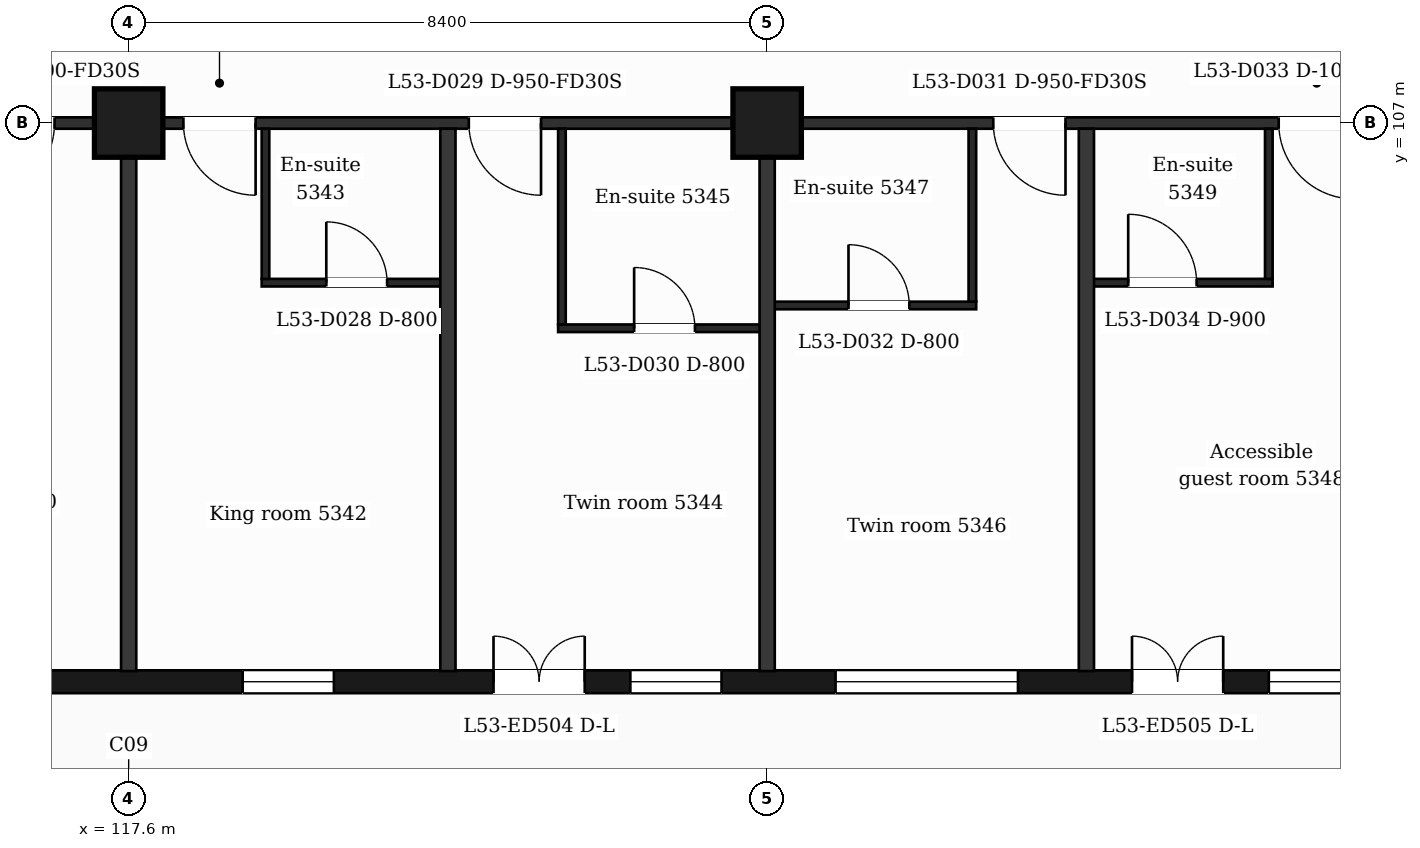
"""IFC4 building model, lengths in metres.
Left out: names, types, materials, properties, quantities, classifications, styles, units other than length and angle.
Written with IfcOpenShell. Run it as: python <this file> out.ifc"""

import sys

from ifc_helpers import new_model, si_unit, direction, frame, frame_2d, origin, origin_2d, place, context, subcontext, project, spatial, rectangle, extrude, element, fill, save


model = new_model("IFC4")
c1 = context("Model", 3, precision=1e-05, world=origin(), true_north=direction((0.0, 1.0)))
c2 = subcontext(c1, "Body", "Model", "MODEL_VIEW")
j1 = project(units=[si_unit("LENGTHUNIT", "METRE"), si_unit("PLANEANGLEUNIT", "RADIAN")], contexts=[c1])
p1 = place(None, origin())
s1 = spatial("IfcSite", under=j1, at=p1, CompositionType="ELEMENT")
p2 = place(p1, origin())
s2 = spatial("IfcBuilding", under=s1, at=p2, CompositionType="ELEMENT")
p3 = place(p2, frame((0.0, 0.0, 220.7)))
s3 = spatial("IfcBuildingStorey", under=s2, at=p3, CompositionType="ELEMENT", Elevation=220.7)
for number, where, z_axis, x_axis in (
    (1, (117.6, 107.0, 0.0), (0.0, 0.0, 1.0), (1.0, 0.0, 0.0)),
    (2, (126.0, 107.0, 0.0), (0.0, 0.0, 1.0), (1.0, 0.0, 0.0)),
):
    element("IfcColumn", number, at=place(p3, frame(where, z_axis=z_axis, x_axis=x_axis)), inside=s3, PredefinedType="COLUMN", context=c2, shape_type="SweptSolid", body=[
        extrude(rectangle(XDim=0.9, YDim=0.9, at=origin_2d()), origin(), (0.0, 0.0, 1.0), 3.7),
    ])
p4 = place(p3, frame((89.85, 99.65, 0.0), z_axis=(0.0, 0.0, 1.0), x_axis=(1.0, 0.0, 0.0)))
e3 = element("IfcWall", 3, at=p4, inside=s3, PredefinedType="SOLIDWALL", context=c2, shape_type="SweptSolid", body=[
    extrude(rectangle(XDim=47.25, YDim=0.3, at=frame_2d((23.625, 0.0))), origin(), (0.0, 0.0, 1.0), 3.38),
])
p5 = place(p4, frame((0.725, 0.0, 0.9)))
e4 = element("IfcOpeningElement", 4, at=p5, cuts=e3, PredefinedType="OPENING", context=c2, shape_type="SweptSolid", body=[
    extrude(rectangle(XDim=1.2, YDim=2.1, at=frame_2d((0.6, 1.05))), frame((0.0, 0.16, 0.0), z_axis=(0.0, -1.0, 0.0), x_axis=(1.0, 0.0, 0.0)), (0.0, 0.0, 1.0), 0.32),
])
p6 = place(p4, frame((3.45, 0.0, 0.9)))
e5 = element("IfcOpeningElement", 5, at=p6, cuts=e3, PredefinedType="OPENING", context=c2, shape_type="SweptSolid", body=[
    extrude(rectangle(XDim=2.4, YDim=2.1, at=frame_2d((1.2, 1.05))), frame((0.0, 0.16, 0.0), z_axis=(0.0, -1.0, 0.0), x_axis=(1.0, 0.0, 0.0)), (0.0, 0.0, 1.0), 0.32),
])
p7 = place(p4, frame((7.65, 0.0, 0.9)))
e6 = element("IfcOpeningElement", 6, at=p7, cuts=e3, PredefinedType="OPENING", context=c2, shape_type="SweptSolid", body=[
    extrude(rectangle(XDim=2.4, YDim=2.1, at=frame_2d((1.2, 1.05))), frame((0.0, 0.16, 0.0), z_axis=(0.0, -1.0, 0.0), x_axis=(1.0, 0.0, 0.0)), (0.0, 0.0, 1.0), 0.32),
])
p8 = place(p4, frame((11.85, 0.0, 0.9)))
e7 = element("IfcOpeningElement", 7, at=p8, cuts=e3, PredefinedType="OPENING", context=c2, shape_type="SweptSolid", body=[
    extrude(rectangle(XDim=2.4, YDim=2.1, at=frame_2d((1.2, 1.05))), frame((0.0, 0.16, 0.0), z_axis=(0.0, -1.0, 0.0), x_axis=(1.0, 0.0, 0.0)), (0.0, 0.0, 1.0), 0.32),
])
p9 = place(p4, frame((16.05, 0.0, 0.9)))
e8 = element("IfcOpeningElement", 8, at=p9, cuts=e3, PredefinedType="OPENING", context=c2, shape_type="SweptSolid", body=[
    extrude(rectangle(XDim=2.4, YDim=2.1, at=frame_2d((1.2, 1.05))), frame((0.0, 0.16, 0.0), z_axis=(0.0, -1.0, 0.0), x_axis=(1.0, 0.0, 0.0)), (0.0, 0.0, 1.0), 0.32),
])
p10 = place(p4, frame((20.25, 0.0, 0.9)))
e9 = element("IfcOpeningElement", 9, at=p10, cuts=e3, PredefinedType="OPENING", context=c2, shape_type="SweptSolid", body=[
    extrude(rectangle(XDim=2.4, YDim=2.1, at=frame_2d((1.2, 1.05))), frame((0.0, 0.16, 0.0), z_axis=(0.0, -1.0, 0.0), x_axis=(1.0, 0.0, 0.0)), (0.0, 0.0, 1.0), 0.32),
])
p11 = place(p4, frame((25.05, 0.0, 0.9)))
e10 = element("IfcOpeningElement", 10, at=p11, cuts=e3, PredefinedType="OPENING", context=c2, shape_type="SweptSolid", body=[
    extrude(rectangle(XDim=1.2, YDim=2.1, at=frame_2d((0.6, 1.05))), frame((0.0, 0.16, 0.0), z_axis=(0.0, -1.0, 0.0), x_axis=(1.0, 0.0, 0.0)), (0.0, 0.0, 1.0), 0.32),
])
p12 = place(p4, frame((29.25, 0.0, 0.9)))
e11 = element("IfcOpeningElement", 11, at=p12, cuts=e3, PredefinedType="OPENING", context=c2, shape_type="SweptSolid", body=[
    extrude(rectangle(XDim=1.2, YDim=2.1, at=frame_2d((0.6, 1.05))), frame((0.0, 0.16, 0.0), z_axis=(0.0, -1.0, 0.0), x_axis=(1.0, 0.0, 0.0)), (0.0, 0.0, 1.0), 0.32),
])
p13 = place(p4, frame((32.55, 0.0, 0.0)))
e12 = element("IfcOpeningElement", 12, at=p13, cuts=e3, PredefinedType="OPENING", context=c2, shape_type="SweptSolid", body=[
    extrude(rectangle(XDim=1.2, YDim=2.4, at=frame_2d((0.6, 1.2))), frame((0.0, 0.16, 0.0), z_axis=(0.0, -1.0, 0.0), x_axis=(1.0, 0.0, 0.0)), (0.0, 0.0, 1.0), 0.32),
])
p14 = place(p4, frame((34.35, 0.0, 0.9)))
e13 = element("IfcOpeningElement", 13, at=p14, cuts=e3, PredefinedType="OPENING", context=c2, shape_type="SweptSolid", body=[
    extrude(rectangle(XDim=1.2, YDim=2.1, at=frame_2d((0.6, 1.05))), frame((0.0, 0.16, 0.0), z_axis=(0.0, -1.0, 0.0), x_axis=(1.0, 0.0, 0.0)), (0.0, 0.0, 1.0), 0.32),
])
p15 = place(p4, frame((37.05, 0.0, 0.9)))
e14 = element("IfcOpeningElement", 14, at=p15, cuts=e3, PredefinedType="OPENING", context=c2, shape_type="SweptSolid", body=[
    extrude(rectangle(XDim=2.4, YDim=2.1, at=frame_2d((1.2, 1.05))), frame((0.0, 0.16, 0.0), z_axis=(0.0, -1.0, 0.0), x_axis=(1.0, 0.0, 0.0)), (0.0, 0.0, 1.0), 0.32),
])
p16 = place(p4, frame((40.95, 0.0, 0.0)))
e15 = element("IfcOpeningElement", 15, at=p16, cuts=e3, PredefinedType="OPENING", context=c2, shape_type="SweptSolid", body=[
    extrude(rectangle(XDim=1.2, YDim=2.4, at=frame_2d((0.6, 1.2))), frame((0.0, 0.16, 0.0), z_axis=(0.0, -1.0, 0.0), x_axis=(1.0, 0.0, 0.0)), (0.0, 0.0, 1.0), 0.32),
])
p17 = place(p4, frame((42.75, 0.0, 0.9)))
e16 = element("IfcOpeningElement", 16, at=p17, cuts=e3, PredefinedType="OPENING", context=c2, shape_type="SweptSolid", body=[
    extrude(rectangle(XDim=1.2, YDim=2.1, at=frame_2d((0.6, 1.05))), frame((0.0, 0.16, 0.0), z_axis=(0.0, -1.0, 0.0), x_axis=(1.0, 0.0, 0.0)), (0.0, 0.0, 1.0), 0.32),
])
p18 = place(p4, frame((45.25, 0.0, 0.9)))
e17 = element("IfcOpeningElement", 17, at=p18, cuts=e3, PredefinedType="OPENING", context=c2, shape_type="SweptSolid", body=[
    extrude(rectangle(XDim=1.2, YDim=2.1, at=frame_2d((0.6, 1.05))), frame((0.0, 0.16, 0.0), z_axis=(0.0, -1.0, 0.0), x_axis=(1.0, 0.0, 0.0)), (0.0, 0.0, 1.0), 0.32),
])
p19 = place(p3, frame((123.25, 104.3, 0.0), z_axis=(0.0, 0.0, 1.0), x_axis=(1.0, 0.0, 0.0)))
e18 = element("IfcWall", 18, at=p19, inside=s3, PredefinedType="PARTITIONING", context=c2, shape_type="SweptSolid", body=[
    extrude(rectangle(XDim=2.75, YDim=0.1, at=frame_2d((1.375, 0.0))), origin(), (0.0, 0.0, 1.0), 3.38),
])
p20 = place(p19, frame((1.0, 0.0, 0.0)))
e19 = element("IfcOpeningElement", 19, at=p20, cuts=e18, PredefinedType="OPENING", context=c2, shape_type="SweptSolid", body=[
    extrude(rectangle(XDim=0.8, YDim=2.1, at=frame_2d((0.4, 1.05))), frame((0.0, 0.06, 0.0), z_axis=(0.0, -1.0, 0.0), x_axis=(1.0, 0.0, 0.0)), (0.0, 0.0, 1.0), 0.12),
])
p21 = place(p3, frame((126.0, 104.6, 0.0), z_axis=(0.0, 0.0, 1.0), x_axis=(1.0, 0.0, 0.0)))
e20 = element("IfcWall", 20, at=p21, inside=s3, PredefinedType="PARTITIONING", context=c2, shape_type="SweptSolid", body=[
    extrude(rectangle(XDim=2.75, YDim=0.1, at=frame_2d((1.375, 0.0))), origin(), (0.0, 0.0, 1.0), 3.38),
])
p22 = place(p21, frame((1.07, 0.0, 0.0)))
e21 = element("IfcOpeningElement", 21, at=p22, cuts=e20, PredefinedType="OPENING", context=c2, shape_type="SweptSolid", body=[
    extrude(rectangle(XDim=0.8, YDim=2.1, at=frame_2d((0.4, 1.05))), frame((0.0, 0.06, 0.0), z_axis=(0.0, -1.0, 0.0), x_axis=(1.0, 0.0, 0.0)), (0.0, 0.0, 1.0), 0.12),
])
p23 = place(p3, frame((119.35, 104.9, 0.0), z_axis=(0.0, 0.0, 1.0), x_axis=(1.0, 0.0, 0.0)))
e22 = element("IfcWall", 22, at=p23, inside=s3, PredefinedType="PARTITIONING", context=c2, shape_type="SweptSolid", body=[
    extrude(rectangle(XDim=2.45, YDim=0.1, at=frame_2d((1.225, 0.0))), origin(), (0.0, 0.0, 1.0), 3.38),
])
p24 = place(p23, frame((0.85, 0.0, 0.0)))
e23 = element("IfcOpeningElement", 23, at=p24, cuts=e22, PredefinedType="OPENING", context=c2, shape_type="SweptSolid", body=[
    extrude(rectangle(XDim=0.8, YDim=2.1, at=frame_2d((0.4, 1.05))), frame((0.0, 0.06, 0.0), z_axis=(0.0, -1.0, 0.0), x_axis=(1.0, 0.0, 0.0)), (0.0, 0.0, 1.0), 0.12),
])
p25 = place(p3, frame((130.2, 104.9, 0.0), z_axis=(0.0, 0.0, 1.0), x_axis=(1.0, 0.0, 0.0)))
e24 = element("IfcWall", 24, at=p25, inside=s3, PredefinedType="PARTITIONING", context=c2, shape_type="SweptSolid", body=[
    extrude(rectangle(XDim=2.45, YDim=0.1, at=frame_2d((1.225, 0.0))), origin(), (0.0, 0.0, 1.0), 3.38),
])
p26 = place(p25, frame((0.55, 0.0, 0.0)))
e25 = element("IfcOpeningElement", 25, at=p26, cuts=e24, PredefinedType="OPENING", context=c2, shape_type="SweptSolid", body=[
    extrude(rectangle(XDim=0.9, YDim=2.1, at=frame_2d((0.45, 1.05))), frame((0.0, 0.06, 0.0), z_axis=(0.0, -1.0, 0.0), x_axis=(1.0, 0.0, 0.0)), (0.0, 0.0, 1.0), 0.12),
])
p27 = place(p3, frame((87.018, 107.0, 0.0), z_axis=(0.0, 0.0, 1.0), x_axis=(1.0, 0.0, 0.0)))
e26 = element("IfcWall", 26, at=p27, inside=s3, PredefinedType="PARTITIONING", context=c2, shape_type="SweptSolid", body=[
    extrude(rectangle(XDim=52.765, YDim=0.15, at=frame_2d((26.382, 0.0))), origin(), (0.0, 0.0, 1.0), 3.38),
])
p28 = place(p27, frame((0.707, 0.0, 0.0)))
e27 = element("IfcOpeningElement", 27, at=p28, cuts=e26, PredefinedType="OPENING", context=c2, shape_type="SweptSolid", body=[
    extrude(rectangle(XDim=0.95, YDim=2.1, at=frame_2d((0.475, 1.05))), frame((0.0, 0.085, 0.0), z_axis=(0.0, -1.0, 0.0), x_axis=(1.0, 0.0, 0.0)), (0.0, 0.0, 1.0), 0.17),
])
p29 = place(p27, frame((6.894, 0.0, 0.0)))
e28 = element("IfcOpeningElement", 28, at=p29, cuts=e26, PredefinedType="OPENING", context=c2, shape_type="SweptSolid", body=[
    extrude(rectangle(XDim=0.95, YDim=2.1, at=frame_2d((0.475, 1.05))), frame((0.0, 0.085, 0.0), z_axis=(0.0, -1.0, 0.0), x_axis=(1.0, 0.0, 0.0)), (0.0, 0.0, 1.0), 0.17),
])
p30 = place(p27, frame((15.662, 0.0, 0.0)))
e29 = element("IfcOpeningElement", 29, at=p30, cuts=e26, PredefinedType="OPENING", context=c2, shape_type="SweptSolid", body=[
    extrude(rectangle(XDim=0.95, YDim=2.1, at=frame_2d((0.475, 1.05))), frame((0.0, 0.085, 0.0), z_axis=(0.0, -1.0, 0.0), x_axis=(1.0, 0.0, 0.0)), (0.0, 0.0, 1.0), 0.17),
])
p31 = place(p27, frame((18.257, 0.0, 0.0)))
e30 = element("IfcOpeningElement", 30, at=p31, cuts=e26, PredefinedType="OPENING", context=c2, shape_type="SweptSolid", body=[
    extrude(rectangle(XDim=0.95, YDim=2.1, at=frame_2d((0.475, 1.05))), frame((0.0, 0.085, 0.0), z_axis=(0.0, -1.0, 0.0), x_axis=(1.0, 0.0, 0.0)), (0.0, 0.0, 1.0), 0.17),
])
p32 = place(p27, frame((28.607, 0.0, 0.0)))
e31 = element("IfcOpeningElement", 31, at=p32, cuts=e26, PredefinedType="OPENING", context=c2, shape_type="SweptSolid", body=[
    extrude(rectangle(XDim=1.0, YDim=2.1, at=frame_2d((0.5, 1.05))), frame((0.0, 0.085, 0.0), z_axis=(0.0, -1.0, 0.0), x_axis=(1.0, 0.0, 0.0)), (0.0, 0.0, 1.0), 0.17),
])
p33 = place(p27, frame((31.302, 0.0, 0.0)))
e32 = element("IfcOpeningElement", 32, at=p33, cuts=e26, PredefinedType="OPENING", context=c2, shape_type="SweptSolid", body=[
    extrude(rectangle(XDim=0.95, YDim=2.1, at=frame_2d((0.475, 1.05))), frame((0.0, 0.085, 0.0), z_axis=(0.0, -1.0, 0.0), x_axis=(1.0, 0.0, 0.0)), (0.0, 0.0, 1.0), 0.17),
])
p34 = place(p27, frame((35.057, 0.0, 0.0)))
e33 = element("IfcOpeningElement", 33, at=p34, cuts=e26, PredefinedType="OPENING", context=c2, shape_type="SweptSolid", body=[
    extrude(rectangle(XDim=0.95, YDim=2.1, at=frame_2d((0.475, 1.05))), frame((0.0, 0.085, 0.0), z_axis=(0.0, -1.0, 0.0), x_axis=(1.0, 0.0, 0.0)), (0.0, 0.0, 1.0), 0.17),
])
p35 = place(p27, frame((41.957, 0.0, 0.0)))
e34 = element("IfcOpeningElement", 34, at=p35, cuts=e26, PredefinedType="OPENING", context=c2, shape_type="SweptSolid", body=[
    extrude(rectangle(XDim=0.95, YDim=2.1, at=frame_2d((0.475, 1.05))), frame((0.0, 0.085, 0.0), z_axis=(0.0, -1.0, 0.0), x_axis=(1.0, 0.0, 0.0)), (0.0, 0.0, 1.0), 0.17),
])
p36 = place(p27, frame((45.712, 0.0, 0.0)))
e35 = element("IfcOpeningElement", 35, at=p36, cuts=e26, PredefinedType="OPENING", context=c2, shape_type="SweptSolid", body=[
    extrude(rectangle(XDim=1.0, YDim=2.1, at=frame_2d((0.5, 1.05))), frame((0.0, 0.085, 0.0), z_axis=(0.0, -1.0, 0.0), x_axis=(1.0, 0.0, 0.0)), (0.0, 0.0, 1.0), 0.17),
])
p37 = place(p27, frame((48.974, 0.0, 0.0)))
e36 = element("IfcOpeningElement", 36, at=p37, cuts=e26, PredefinedType="OPENING", context=c2, shape_type="SweptSolid", body=[
    extrude(rectangle(XDim=0.95, YDim=2.1, at=frame_2d((0.475, 1.05))), frame((0.0, 0.085, 0.0), z_axis=(0.0, -1.0, 0.0), x_axis=(1.0, 0.0, 0.0)), (0.0, 0.0, 1.0), 0.17),
])
p38 = place(p3, frame((117.6, 99.79, 0.0), z_axis=(0.0, 0.0, 1.0), x_axis=(0.0, 1.0, 0.0)))
e37 = element("IfcWall", 37, at=p38, inside=s3, PredefinedType="PARTITIONING", context=c2, shape_type="SweptSolid", body=[
    extrude(rectangle(XDim=7.135, YDim=0.2, at=frame_2d((3.567, 0.0))), origin(), (0.0, 0.0, 1.0), 3.38),
])
p39 = place(p3, frame((119.4, 104.95, 0.0), z_axis=(0.0, 0.0, 1.0), x_axis=(0.0, 1.0, 0.0)))
e38 = element("IfcWall", 38, at=p39, inside=s3, PredefinedType="PARTITIONING", context=c2, shape_type="SweptSolid", body=[
    extrude(rectangle(XDim=1.975, YDim=0.1, at=frame_2d((0.988, 0.0))), origin(), (0.0, 0.0, 1.0), 3.38),
])
p40 = place(p3, frame((121.8, 99.79, 0.0), z_axis=(0.0, 0.0, 1.0), x_axis=(0.0, 1.0, 0.0)))
e39 = element("IfcWall", 39, at=p40, inside=s3, PredefinedType="PARTITIONING", context=c2, shape_type="SweptSolid", body=[
    extrude(rectangle(XDim=7.135, YDim=0.2, at=frame_2d((3.567, 0.0))), origin(), (0.0, 0.0, 1.0), 3.38),
])
p41 = place(p3, frame((123.3, 104.35, 0.0), z_axis=(0.0, 0.0, 1.0), x_axis=(0.0, 1.0, 0.0)))
e40 = element("IfcWall", 40, at=p41, inside=s3, PredefinedType="PARTITIONING", context=c2, shape_type="SweptSolid", body=[
    extrude(rectangle(XDim=2.575, YDim=0.1, at=frame_2d((1.288, 0.0))), origin(), (0.0, 0.0, 1.0), 3.38),
])
p42 = place(p3, frame((126.0, 99.79, 0.0), z_axis=(0.0, 0.0, 1.0), x_axis=(0.0, 1.0, 0.0)))
e41 = element("IfcWall", 41, at=p42, inside=s3, PredefinedType="PARTITIONING", context=c2, shape_type="SweptSolid", body=[
    extrude(rectangle(XDim=7.135, YDim=0.2, at=frame_2d((3.567, 0.0))), origin(), (0.0, 0.0, 1.0), 3.38),
])
p43 = place(p3, frame((128.7, 104.65, 0.0), z_axis=(0.0, 0.0, 1.0), x_axis=(0.0, 1.0, 0.0)))
e42 = element("IfcWall", 42, at=p43, inside=s3, PredefinedType="PARTITIONING", context=c2, shape_type="SweptSolid", body=[
    extrude(rectangle(XDim=2.275, YDim=0.1, at=frame_2d((1.138, 0.0))), origin(), (0.0, 0.0, 1.0), 3.38),
])
p44 = place(p3, frame((130.2, 99.79, 0.0), z_axis=(0.0, 0.0, 1.0), x_axis=(0.0, 1.0, 0.0)))
e43 = element("IfcWall", 43, at=p44, inside=s3, PredefinedType="PARTITIONING", context=c2, shape_type="SweptSolid", body=[
    extrude(rectangle(XDim=7.135, YDim=0.2, at=frame_2d((3.567, 0.0))), origin(), (0.0, 0.0, 1.0), 3.38),
])
p45 = place(p3, frame((132.6, 104.95, 0.0), z_axis=(0.0, 0.0, 1.0), x_axis=(0.0, 1.0, 0.0)))
e44 = element("IfcWall", 44, at=p45, inside=s3, PredefinedType="PARTITIONING", context=c2, shape_type="SweptSolid", body=[
    extrude(rectangle(XDim=1.975, YDim=0.1, at=frame_2d((0.988, 0.0))), origin(), (0.0, 0.0, 1.0), 3.38),
])
p46 = place(p12, origin())
e45 = element("IfcWindow", 45, at=p46, inside=s3, PartitioningType="SINGLE_PANEL", PredefinedType="WINDOW", context=c2, shape_type="SweptSolid", body=[
    extrude(rectangle(XDim=1.2, YDim=2.1, at=frame_2d((0.6, 1.05))), frame((0.0, 0.03, 0.0), z_axis=(0.0, -1.0, 0.0), x_axis=(1.0, 0.0, 0.0)), (0.0, 0.0, 1.0), 0.06),
])
fill(e11, e45)
p47 = place(p13, origin())
e46 = element("IfcDoor", 46, at=p47, inside=s3, OperationType="DOUBLE_DOOR_SINGLE_SWING", PredefinedType="DOOR", context=c2, shape_type="SweptSolid", body=[
    extrude(rectangle(XDim=1.2, YDim=2.4, at=frame_2d((0.6, 1.2))), frame((0.0, 0.025, 0.0), z_axis=(0.0, -1.0, 0.0), x_axis=(1.0, 0.0, 0.0)), (0.0, 0.0, 1.0), 0.05),
])
fill(e12, e46)
p48 = place(p14, origin())
e47 = element("IfcWindow", 47, at=p48, inside=s3, PartitioningType="SINGLE_PANEL", PredefinedType="WINDOW", context=c2, shape_type="SweptSolid", body=[
    extrude(rectangle(XDim=1.2, YDim=2.1, at=frame_2d((0.6, 1.05))), frame((0.0, 0.03, 0.0), z_axis=(0.0, -1.0, 0.0), x_axis=(1.0, 0.0, 0.0)), (0.0, 0.0, 1.0), 0.06),
])
fill(e13, e47)
p49 = place(p15, origin())
e48 = element("IfcWindow", 48, at=p49, inside=s3, PartitioningType="SINGLE_PANEL", PredefinedType="WINDOW", context=c2, shape_type="SweptSolid", body=[
    extrude(rectangle(XDim=2.4, YDim=2.1, at=frame_2d((1.2, 1.05))), frame((0.0, 0.03, 0.0), z_axis=(0.0, -1.0, 0.0), x_axis=(1.0, 0.0, 0.0)), (0.0, 0.0, 1.0), 0.06),
])
fill(e14, e48)
p50 = place(p16, origin())
e49 = element("IfcDoor", 49, at=p50, inside=s3, OperationType="DOUBLE_DOOR_SINGLE_SWING", PredefinedType="DOOR", context=c2, shape_type="SweptSolid", body=[
    extrude(rectangle(XDim=1.2, YDim=2.4, at=frame_2d((0.6, 1.2))), frame((0.0, 0.025, 0.0), z_axis=(0.0, -1.0, 0.0), x_axis=(1.0, 0.0, 0.0)), (0.0, 0.0, 1.0), 0.05),
])
fill(e15, e49)
p51 = place(p17, origin())
e50 = element("IfcWindow", 50, at=p51, inside=s3, PartitioningType="SINGLE_PANEL", PredefinedType="WINDOW", context=c2, shape_type="SweptSolid", body=[
    extrude(rectangle(XDim=1.2, YDim=2.1, at=frame_2d((0.6, 1.05))), frame((0.0, 0.03, 0.0), z_axis=(0.0, -1.0, 0.0), x_axis=(1.0, 0.0, 0.0)), (0.0, 0.0, 1.0), 0.06),
])
fill(e16, e50)
p52 = place(p32, origin())
e51 = element("IfcDoor", 51, at=p52, inside=s3, OperationType="SINGLE_SWING_LEFT", PredefinedType="DOOR", context=c2, shape_type="SweptSolid", body=[
    extrude(rectangle(XDim=1.0, YDim=2.1, at=frame_2d((0.5, 1.05))), frame((0.0, 0.025, 0.0), z_axis=(0.0, -1.0, 0.0), x_axis=(1.0, 0.0, 0.0)), (0.0, 0.0, 1.0), 0.05),
])
fill(e31, e51)
p53 = place(p33, origin())
e52 = element("IfcDoor", 52, at=p53, inside=s3, OperationType="SINGLE_SWING_RIGHT", PredefinedType="DOOR", context=c2, shape_type="SweptSolid", body=[
    extrude(rectangle(XDim=0.95, YDim=2.1, at=frame_2d((0.475, 1.05))), frame((0.0, 0.025, 0.0), z_axis=(0.0, -1.0, 0.0), x_axis=(1.0, 0.0, 0.0)), (0.0, 0.0, 1.0), 0.05),
])
fill(e32, e52)
p54 = place(p24, origin())
e53 = element("IfcDoor", 53, at=p54, inside=s3, OperationType="SINGLE_SWING_LEFT", PredefinedType="DOOR", context=c2, shape_type="SweptSolid", body=[
    extrude(rectangle(XDim=0.8, YDim=2.1, at=frame_2d((0.4, 1.05))), frame((0.0, 0.025, 0.0), z_axis=(0.0, -1.0, 0.0), x_axis=(1.0, 0.0, 0.0)), (0.0, 0.0, 1.0), 0.05),
])
fill(e23, e53)
p55 = place(p34, origin())
e54 = element("IfcDoor", 54, at=p55, inside=s3, OperationType="SINGLE_SWING_RIGHT", PredefinedType="DOOR", context=c2, shape_type="SweptSolid", body=[
    extrude(rectangle(XDim=0.95, YDim=2.1, at=frame_2d((0.475, 1.05))), frame((0.0, 0.025, 0.0), z_axis=(0.0, -1.0, 0.0), x_axis=(1.0, 0.0, 0.0)), (0.0, 0.0, 1.0), 0.05),
])
fill(e33, e54)
p56 = place(p20, origin())
e55 = element("IfcDoor", 55, at=p56, inside=s3, OperationType="SINGLE_SWING_LEFT", PredefinedType="DOOR", context=c2, shape_type="SweptSolid", body=[
    extrude(rectangle(XDim=0.8, YDim=2.1, at=frame_2d((0.4, 1.05))), frame((0.0, 0.025, 0.0), z_axis=(0.0, -1.0, 0.0), x_axis=(1.0, 0.0, 0.0)), (0.0, 0.0, 1.0), 0.05),
])
fill(e19, e55)
p57 = place(p35, origin())
e56 = element("IfcDoor", 56, at=p57, inside=s3, OperationType="SINGLE_SWING_RIGHT", PredefinedType="DOOR", context=c2, shape_type="SweptSolid", body=[
    extrude(rectangle(XDim=0.95, YDim=2.1, at=frame_2d((0.475, 1.05))), frame((0.0, 0.025, 0.0), z_axis=(0.0, -1.0, 0.0), x_axis=(1.0, 0.0, 0.0)), (0.0, 0.0, 1.0), 0.05),
])
fill(e34, e56)
p58 = place(p22, origin())
e57 = element("IfcDoor", 57, at=p58, inside=s3, OperationType="SINGLE_SWING_LEFT", PredefinedType="DOOR", context=c2, shape_type="SweptSolid", body=[
    extrude(rectangle(XDim=0.8, YDim=2.1, at=frame_2d((0.4, 1.05))), frame((0.0, 0.025, 0.0), z_axis=(0.0, -1.0, 0.0), x_axis=(1.0, 0.0, 0.0)), (0.0, 0.0, 1.0), 0.05),
])
fill(e21, e57)
p59 = place(p36, origin())
e58 = element("IfcDoor", 58, at=p59, inside=s3, OperationType="SINGLE_SWING_RIGHT", PredefinedType="DOOR", context=c2, shape_type="SweptSolid", body=[
    extrude(rectangle(XDim=1.0, YDim=2.1, at=frame_2d((0.5, 1.05))), frame((0.0, 0.025, 0.0), z_axis=(0.0, -1.0, 0.0), x_axis=(1.0, 0.0, 0.0)), (0.0, 0.0, 1.0), 0.05),
])
fill(e35, e58)
p60 = place(p26, origin())
e59 = element("IfcDoor", 59, at=p60, inside=s3, OperationType="SINGLE_SWING_LEFT", PredefinedType="DOOR", context=c2, shape_type="SweptSolid", body=[
    extrude(rectangle(XDim=0.9, YDim=2.1, at=frame_2d((0.45, 1.05))), frame((0.0, 0.025, 0.0), z_axis=(0.0, -1.0, 0.0), x_axis=(1.0, 0.0, 0.0)), (0.0, 0.0, 1.0), 0.05),
])
fill(e25, e59)
save(model, sys.argv[1])
